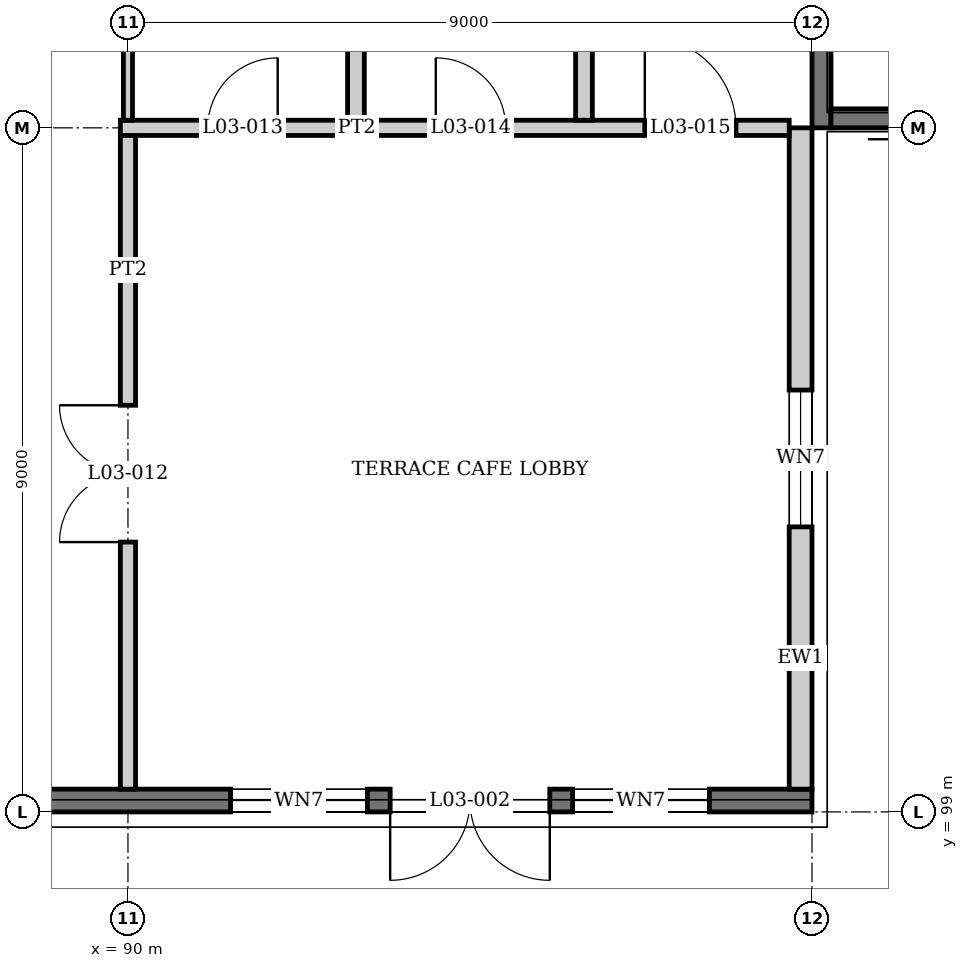
"""IFC4 building model, lengths in metres.
Left out: names, types, materials, properties, quantities, classifications, styles, units other than length and angle.
Written with IfcOpenShell. Run it as: python <this file> out.ifc"""

import sys

from ifc_helpers import new_model, si_unit, direction, frame, frame_2d, origin, place, context, subcontext, project, spatial, rectangle, extrude, element, fill, save


model = new_model("IFC4")
c1 = context("Model", 3, precision=1e-05, world=origin(), true_north=direction((0.0, 1.0)))
c2 = subcontext(c1, "Body", "Model", "MODEL_VIEW")
j1 = project(units=[si_unit("LENGTHUNIT", "METRE"), si_unit("PLANEANGLEUNIT", "RADIAN")], contexts=[c1])
p1 = place(None, origin())
s1 = spatial("IfcSite", under=j1, at=p1, CompositionType="ELEMENT")
p2 = place(p1, origin())
s2 = spatial("IfcBuilding", under=s1, at=p2, CompositionType="ELEMENT")
p3 = place(p2, frame((0.0, 0.0, 15.0)))
s3 = spatial("IfcBuildingStorey", under=s2, at=p3, CompositionType="ELEMENT", Elevation=15.0)
p4 = place(p3, frame((99.125, 108.0, 0.0), z_axis=(0.0, 0.0, 1.0), x_axis=(0.0, 1.0, 0.0)))
e1 = element("IfcWall", 1, at=p4, inside=s3, PredefinedType="SHEAR", context=c2, shape_type="SweptSolid", body=[
    extrude(rectangle(XDim=9.0, YDim=0.25, at=frame_2d((4.5, 0.0))), origin(), (0.0, 0.0, 1.0), 4.05),
])
p5 = place(p3, frame((99.25, 108.125, 0.0), z_axis=(0.0, 0.0, 1.0), x_axis=(1.0, 0.0, 0.0)))
e2 = element("IfcWall", 2, at=p5, inside=s3, PredefinedType="SHEAR", context=c2, shape_type="SweptSolid", body=[
    extrude(rectangle(XDim=8.5, YDim=0.25, at=frame_2d((4.25, 0.0))), origin(), (0.0, 0.0, 1.0), 4.05),
])
p6 = place(p5, frame((7.1, 0.0, 0.0)))
e3 = element("IfcOpeningElement", 3, at=p6, cuts=e2, PredefinedType="OPENING", context=c2, shape_type="SweptSolid", body=[
    extrude(rectangle(XDim=1.0, YDim=2.1, at=frame_2d((0.5, 1.05))), frame((0.0, 0.135, 0.0), z_axis=(0.0, -1.0, 0.0), x_axis=(1.0, 0.0, 0.0)), (0.0, 0.0, 1.0), 0.27),
])
p7 = place(p3, frame((72.0, 99.15, 0.0), z_axis=(0.0, 0.0, 1.0), x_axis=(1.0, 0.0, 0.0)))
e4 = element("IfcWall", 4, at=p7, inside=s3, PredefinedType="SOLIDWALL", context=c2, shape_type="SweptSolid", body=[
    extrude(rectangle(XDim=27.0, YDim=0.3, at=frame_2d((13.5, 0.0))), origin(), (0.0, 0.0, 1.0), 3.1),
])
p8 = place(p7, frame((1.35, 0.0, 0.9)))
e5 = element("IfcOpeningElement", 5, at=p8, cuts=e4, PredefinedType="OPENING", context=c2, shape_type="SweptSolid", body=[
    extrude(rectangle(XDim=1.8, YDim=2.1, at=frame_2d((0.9, 1.05))), frame((0.0, 0.16, 0.0), z_axis=(0.0, -1.0, 0.0), x_axis=(1.0, 0.0, 0.0)), (0.0, 0.0, 1.0), 0.32),
])
p9 = place(p7, frame((5.85, 0.0, 0.9)))
e6 = element("IfcOpeningElement", 6, at=p9, cuts=e4, PredefinedType="OPENING", context=c2, shape_type="SweptSolid", body=[
    extrude(rectangle(XDim=1.8, YDim=2.1, at=frame_2d((0.9, 1.05))), frame((0.0, 0.16, 0.0), z_axis=(0.0, -1.0, 0.0), x_axis=(1.0, 0.0, 0.0)), (0.0, 0.0, 1.0), 0.32),
])
p10 = place(p7, frame((10.35, 0.0, 0.9)))
e7 = element("IfcOpeningElement", 7, at=p10, cuts=e4, PredefinedType="OPENING", context=c2, shape_type="SweptSolid", body=[
    extrude(rectangle(XDim=1.8, YDim=2.1, at=frame_2d((0.9, 1.05))), frame((0.0, 0.16, 0.0), z_axis=(0.0, -1.0, 0.0), x_axis=(1.0, 0.0, 0.0)), (0.0, 0.0, 1.0), 0.32),
])
p11 = place(p7, frame((14.85, 0.0, 0.9)))
e8 = element("IfcOpeningElement", 8, at=p11, cuts=e4, PredefinedType="OPENING", context=c2, shape_type="SweptSolid", body=[
    extrude(rectangle(XDim=1.8, YDim=2.1, at=frame_2d((0.9, 1.05))), frame((0.0, 0.16, 0.0), z_axis=(0.0, -1.0, 0.0), x_axis=(1.0, 0.0, 0.0)), (0.0, 0.0, 1.0), 0.32),
])
p12 = place(p7, frame((19.35, 0.0, 0.9)))
e9 = element("IfcOpeningElement", 9, at=p12, cuts=e4, PredefinedType="OPENING", context=c2, shape_type="SweptSolid", body=[
    extrude(rectangle(XDim=1.8, YDim=2.1, at=frame_2d((0.9, 1.05))), frame((0.0, 0.16, 0.0), z_axis=(0.0, -1.0, 0.0), x_axis=(1.0, 0.0, 0.0)), (0.0, 0.0, 1.0), 0.32),
])
p13 = place(p7, frame((23.85, 0.0, 0.9)))
e10 = element("IfcOpeningElement", 10, at=p13, cuts=e4, PredefinedType="OPENING", context=c2, shape_type="SweptSolid", body=[
    extrude(rectangle(XDim=1.8, YDim=2.1, at=frame_2d((0.9, 1.05))), frame((0.0, 0.16, 0.0), z_axis=(0.0, -1.0, 0.0), x_axis=(1.0, 0.0, 0.0)), (0.0, 0.0, 1.0), 0.32),
])
p14 = place(p7, frame((7.95, 0.0, 0.0)))
e11 = element("IfcOpeningElement", 11, at=p14, cuts=e4, PredefinedType="OPENING", context=c2, shape_type="SweptSolid", body=[
    extrude(rectangle(XDim=2.1, YDim=2.4, at=frame_2d((1.05, 1.2))), frame((0.0, 0.16, 0.0), z_axis=(0.0, -1.0, 0.0), x_axis=(1.0, 0.0, 0.0)), (0.0, 0.0, 1.0), 0.32),
])
p15 = place(p7, frame((21.45, 0.0, 0.0)))
e12 = element("IfcOpeningElement", 12, at=p15, cuts=e4, PredefinedType="OPENING", context=c2, shape_type="SweptSolid", body=[
    extrude(rectangle(XDim=2.1, YDim=2.4, at=frame_2d((1.05, 1.2))), frame((0.0, 0.16, 0.0), z_axis=(0.0, -1.0, 0.0), x_axis=(1.0, 0.0, 0.0)), (0.0, 0.0, 1.0), 0.32),
])
p16 = place(p3, frame((98.85, 99.3, 0.0), z_axis=(0.0, 0.0, 1.0), x_axis=(0.0, 1.0, 0.0)))
e13 = element("IfcWall", 13, at=p16, inside=s3, PredefinedType="SOLIDWALL", context=c2, shape_type="SweptSolid", body=[
    extrude(rectangle(XDim=8.7, YDim=0.3, at=frame_2d((4.35, 0.0))), origin(), (0.0, 0.0, 1.0), 3.1),
])
p17 = place(p16, frame((3.45, 0.0, 0.9)))
e14 = element("IfcOpeningElement", 14, at=p17, cuts=e13, PredefinedType="OPENING", context=c2, shape_type="SweptSolid", body=[
    extrude(rectangle(XDim=1.8, YDim=2.1, at=frame_2d((0.9, 1.05))), frame((0.0, 0.16, 0.0), z_axis=(0.0, -1.0, 0.0), x_axis=(1.0, 0.0, 0.0)), (0.0, 0.0, 1.0), 0.32),
])
p18 = place(p3, frame((72.0, 99.08, 3.942), z_axis=(0.0, 0.0, 1.0), x_axis=(1.0, 0.0, 0.0)))
e15 = element("IfcWall", 15, at=p18, inside=s3, PredefinedType="PARAPET", context=c2, shape_type="SweptSolid", body=[
    extrude(rectangle(XDim=27.0, YDim=0.16, at=frame_2d((13.5, 0.0))), origin(), (0.0, 0.0, 1.0), 1.14),
])
p19 = place(p3, frame((89.9, 108.0, 0.0), z_axis=(0.0, 0.0, 1.0), x_axis=(1.0, 0.0, 0.0)))
e16 = element("IfcWall", 16, at=p19, inside=s3, PredefinedType="PARTITIONING", context=c2, shape_type="SweptSolid", body=[
    extrude(rectangle(XDim=8.8, YDim=0.2, at=frame_2d((4.4, 0.0))), origin(), (0.0, 0.0, 1.0), 3.1),
])
p20 = place(p19, frame((1.15, 0.0, 0.0)))
e17 = element("IfcOpeningElement", 17, at=p20, cuts=e16, PredefinedType="OPENING", context=c2, shape_type="SweptSolid", body=[
    extrude(rectangle(XDim=0.92, YDim=2.1, at=frame_2d((0.46, 1.05))), frame((0.0, 0.11, 0.0), z_axis=(0.0, -1.0, 0.0), x_axis=(1.0, 0.0, 0.0)), (0.0, 0.0, 1.0), 0.22),
])
p21 = place(p19, frame((4.15, 0.0, 0.0)))
e18 = element("IfcOpeningElement", 18, at=p21, cuts=e16, PredefinedType="OPENING", context=c2, shape_type="SweptSolid", body=[
    extrude(rectangle(XDim=0.92, YDim=2.1, at=frame_2d((0.46, 1.05))), frame((0.0, 0.11, 0.0), z_axis=(0.0, -1.0, 0.0), x_axis=(1.0, 0.0, 0.0)), (0.0, 0.0, 1.0), 0.22),
])
p22 = place(p19, frame((6.9, 0.0, 0.0)))
e19 = element("IfcOpeningElement", 19, at=p22, cuts=e16, PredefinedType="OPENING", context=c2, shape_type="SweptSolid", body=[
    extrude(rectangle(XDim=1.2, YDim=2.1, at=frame_2d((0.6, 1.05))), frame((0.0, 0.11, 0.0), z_axis=(0.0, -1.0, 0.0), x_axis=(1.0, 0.0, 0.0)), (0.0, 0.0, 1.0), 0.22),
])
p23 = place(p3, frame((90.0, 99.3, 0.0), z_axis=(0.0, 0.0, 1.0), x_axis=(0.0, 1.0, 0.0)))
e20 = element("IfcWall", 20, at=p23, inside=s3, PredefinedType="PARTITIONING", context=c2, shape_type="SweptSolid", body=[
    extrude(rectangle(XDim=8.6, YDim=0.2, at=frame_2d((4.3, 0.0))), origin(), (0.0, 0.0, 1.0), 3.1),
])
p24 = place(p23, frame((3.25, 0.0, 0.0)))
e21 = element("IfcOpeningElement", 21, at=p24, cuts=e20, PredefinedType="OPENING", context=c2, shape_type="SweptSolid", body=[
    extrude(rectangle(XDim=1.8, YDim=2.1, at=frame_2d((0.9, 1.05))), frame((0.0, 0.11, 0.0), z_axis=(0.0, -1.0, 0.0), x_axis=(1.0, 0.0, 0.0)), (0.0, 0.0, 1.0), 0.22),
])
p25 = place(p3, frame((90.0, 108.1, 0.0), z_axis=(0.0, 0.0, 1.0), x_axis=(0.0, 1.0, 0.0)))
e22 = element("IfcWall", 22, at=p25, inside=s3, PredefinedType="PARTITIONING", context=c2, shape_type="SweptSolid", body=[
    extrude(rectangle(XDim=4.287, YDim=0.12, at=frame_2d((2.144, 0.0))), origin(), (0.0, 0.0, 1.0), 3.1),
])
p26 = place(p3, frame((93.0, 108.1, 0.0), z_axis=(0.0, 0.0, 1.0), x_axis=(0.0, 1.0, 0.0)))
e23 = element("IfcWall", 23, at=p26, inside=s3, PredefinedType="PLUMBINGWALL", context=c2, shape_type="SweptSolid", body=[
    extrude(rectangle(XDim=4.287, YDim=0.22, at=frame_2d((2.144, 0.0))), origin(), (0.0, 0.0, 1.0), 3.1),
])
p27 = place(p3, frame((96.0, 108.1, 0.0), z_axis=(0.0, 0.0, 1.0), x_axis=(0.0, 1.0, 0.0)))
e24 = element("IfcWall", 24, at=p27, inside=s3, PredefinedType="PLUMBINGWALL", context=c2, shape_type="SweptSolid", body=[
    extrude(rectangle(XDim=4.32, YDim=0.22, at=frame_2d((2.16, 0.0))), origin(), (0.0, 0.0, 1.0), 3.1),
])
p28 = place(p12, origin())
e25 = element("IfcWindow", 25, at=p28, inside=s3, PartitioningType="SINGLE_PANEL", PredefinedType="WINDOW", context=c2, shape_type="SweptSolid", body=[
    extrude(rectangle(XDim=1.8, YDim=2.1, at=frame_2d((0.9, 1.05))), frame((0.0, 0.03, 0.0), z_axis=(0.0, -1.0, 0.0), x_axis=(1.0, 0.0, 0.0)), (0.0, 0.0, 1.0), 0.06),
])
fill(e9, e25)
p29 = place(p13, origin())
e26 = element("IfcWindow", 26, at=p29, inside=s3, PartitioningType="SINGLE_PANEL", PredefinedType="WINDOW", context=c2, shape_type="SweptSolid", body=[
    extrude(rectangle(XDim=1.8, YDim=2.1, at=frame_2d((0.9, 1.05))), frame((0.0, 0.03, 0.0), z_axis=(0.0, -1.0, 0.0), x_axis=(1.0, 0.0, 0.0)), (0.0, 0.0, 1.0), 0.06),
])
fill(e10, e26)
p30 = place(p17, origin())
e27 = element("IfcWindow", 27, at=p30, inside=s3, PartitioningType="SINGLE_PANEL", PredefinedType="WINDOW", context=c2, shape_type="SweptSolid", body=[
    extrude(rectangle(XDim=1.8, YDim=2.1, at=frame_2d((0.9, 1.05))), frame((0.0, 0.03, 0.0), z_axis=(0.0, -1.0, 0.0), x_axis=(1.0, 0.0, 0.0)), (0.0, 0.0, 1.0), 0.06),
])
fill(e14, e27)
p31 = place(p15, frame((2.1, 0.0, 0.0), z_axis=(0.0, 0.0, 1.0), x_axis=(-1.0, 0.0, 0.0)))
e28 = element("IfcDoor", 28, at=p31, inside=s3, OperationType="DOUBLE_DOOR_SINGLE_SWING", PredefinedType="DOOR", context=c2, shape_type="SweptSolid", body=[
    extrude(rectangle(XDim=2.1, YDim=2.4, at=frame_2d((1.05, 1.2))), frame((0.0, 0.025, 0.0), z_axis=(0.0, -1.0, 0.0), x_axis=(1.0, 0.0, 0.0)), (0.0, 0.0, 1.0), 0.05),
])
fill(e12, e28)
p32 = place(p24, origin())
e29 = element("IfcDoor", 29, at=p32, inside=s3, OperationType="DOUBLE_DOOR_SINGLE_SWING", PredefinedType="DOOR", context=c2, shape_type="SweptSolid", body=[
    extrude(rectangle(XDim=1.8, YDim=2.1, at=frame_2d((0.9, 1.05))), frame((0.0, 0.025, 0.0), z_axis=(0.0, -1.0, 0.0), x_axis=(1.0, 0.0, 0.0)), (0.0, 0.0, 1.0), 0.05),
])
fill(e21, e29)
p33 = place(p20, origin())
e30 = element("IfcDoor", 30, at=p33, inside=s3, OperationType="SINGLE_SWING_RIGHT", PredefinedType="DOOR", context=c2, shape_type="SweptSolid", body=[
    extrude(rectangle(XDim=0.92, YDim=2.1, at=frame_2d((0.46, 1.05))), frame((0.0, 0.025, 0.0), z_axis=(0.0, -1.0, 0.0), x_axis=(1.0, 0.0, 0.0)), (0.0, 0.0, 1.0), 0.05),
])
fill(e17, e30)
p34 = place(p21, origin())
e31 = element("IfcDoor", 31, at=p34, inside=s3, OperationType="SINGLE_SWING_LEFT", PredefinedType="DOOR", context=c2, shape_type="SweptSolid", body=[
    extrude(rectangle(XDim=0.92, YDim=2.1, at=frame_2d((0.46, 1.05))), frame((0.0, 0.025, 0.0), z_axis=(0.0, -1.0, 0.0), x_axis=(1.0, 0.0, 0.0)), (0.0, 0.0, 1.0), 0.05),
])
fill(e18, e31)
p35 = place(p22, origin())
e32 = element("IfcDoor", 32, at=p35, inside=s3, OperationType="SINGLE_SWING_LEFT", PredefinedType="DOOR", context=c2, shape_type="SweptSolid", body=[
    extrude(rectangle(XDim=1.2, YDim=2.1, at=frame_2d((0.6, 1.05))), frame((0.0, 0.025, 0.0), z_axis=(0.0, -1.0, 0.0), x_axis=(1.0, 0.0, 0.0)), (0.0, 0.0, 1.0), 0.05),
])
fill(e19, e32)
save(model, sys.argv[1])
